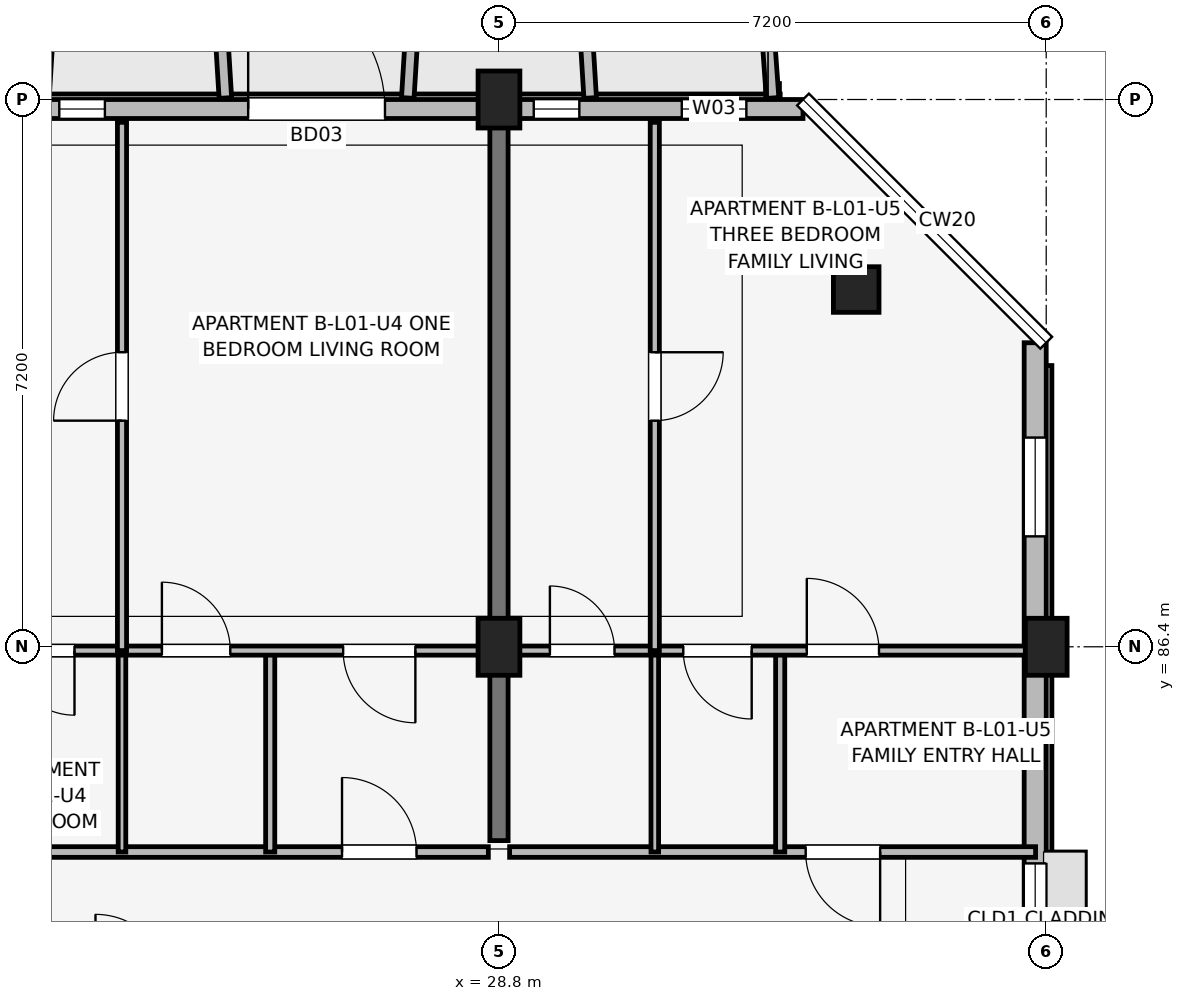
"""IFC4 building model, lengths in metres.
Left out: names, types, materials, properties, quantities, classifications, styles, units other than length and angle.
Written with IfcOpenShell. Run it as: python <this file> out.ifc"""

import sys

from ifc_helpers import new_model, si_unit, direction, frame, frame_2d, origin, origin_2d, place, context, subcontext, project, spatial, rectangle, extrude, element, fill, save


model = new_model("IFC4")
c1 = context("Model", 3, precision=1e-05, world=origin(), true_north=direction((0.0, 1.0)))
c2 = subcontext(c1, "Body", "Model", "MODEL_VIEW")
j1 = project(units=[si_unit("LENGTHUNIT", "METRE"), si_unit("PLANEANGLEUNIT", "RADIAN")], contexts=[c1])
p1 = place(None, origin())
s1 = spatial("IfcSite", under=j1, at=p1, CompositionType="ELEMENT")
p2 = place(p1, origin())
s2 = spatial("IfcBuilding", under=s1, at=p2, CompositionType="ELEMENT")
p3 = place(p2, frame((0.0, 0.0, 4.5)))
s3 = spatial("IfcBuildingStorey", under=s2, at=p3, CompositionType="ELEMENT", Elevation=4.5)
for number, where, z_axis, x_axis in (
    (1, (28.8, 86.4, 0.0), (0.0, 0.0, 1.0), (1.0, 0.0, 0.0)),
    (2, (28.8, 93.6, 0.0), (0.0, 0.0, 1.0), (1.0, 0.0, 0.0)),
    (3, (36.0, 86.4, 0.0), (0.0, 0.0, 1.0), (1.0, 0.0, 0.0)),
):
    element("IfcColumn", number, at=place(p3, frame(where, z_axis=z_axis, x_axis=x_axis)), inside=s3, PredefinedType="COLUMN", context=c2, shape_type="SweptSolid", body=[
        extrude(rectangle(XDim=0.55, YDim=0.75, at=origin_2d()), origin(), (0.0, 0.0, 1.0), 4.2),
    ])
p4 = place(p3, frame((33.5, 91.1, 0.0), z_axis=(0.0, 0.0, 1.0), x_axis=(1.0, 0.0, 0.0)))
e4 = element("IfcColumn", 4, at=p4, inside=s3, PredefinedType="COLUMN", context=c2, shape_type="SweptSolid", body=[
    extrude(rectangle(XDim=0.6, YDim=0.6, at=origin_2d()), origin(), (0.0, 0.0, 1.0), 4.2),
])
p5 = place(p3, frame((28.8, 83.85, 0.0), z_axis=(0.0, 0.0, 1.0), x_axis=(0.0, 1.0, 0.0)))
e5 = element("IfcWall", 5, at=p5, inside=s3, PredefinedType="SHEAR", context=c2, shape_type="SweptSolid", body=[
    extrude(rectangle(XDim=9.4, YDim=0.24, at=frame_2d((4.7, 0.0))), origin(), (0.0, 0.0, 1.0), 4.2),
])
p6 = place(p3, frame((35.855, 75.2, 0.0), z_axis=(0.0, 0.0, 1.0), x_axis=(0.0, 1.0, 0.0)))
e6 = element("IfcWall", 6, at=p6, inside=s3, PredefinedType="SOLIDWALL", context=c2, shape_type="SweptSolid", body=[
    extrude(rectangle(XDim=15.2, YDim=0.29, at=frame_2d((7.6, 0.0))), origin(), (0.0, 0.0, 1.0), 3.43),
])
p7 = place(p6, frame((1.6, 0.0, 0.0), z_axis=(0.0, 0.0, 1.0), x_axis=(-1.0, 0.0, 0.0)))
e7 = element("IfcOpeningElement", 7, at=p7, cuts=e6, PredefinedType="OPENING", context=c2, shape_type="SweptSolid", body=[
    extrude(rectangle(XDim=1.1, YDim=2.15, at=frame_2d((0.55, 1.075))), frame((0.0, 0.155, 0.0), z_axis=(0.0, -1.0, 0.0), x_axis=(1.0, 0.0, 0.0)), (0.0, 0.0, 1.0), 0.31),
])
p8 = place(p6, frame((6.85, 0.0, 1.05)))
e8 = element("IfcOpeningElement", 8, at=p8, cuts=e6, PredefinedType="OPENING", context=c2, shape_type="SweptSolid", body=[
    extrude(rectangle(XDim=1.5, YDim=1.15, at=frame_2d((0.75, 0.575))), frame((0.0, 0.155, 0.0), z_axis=(0.0, -1.0, 0.0), x_axis=(1.0, 0.0, 0.0)), (0.0, 0.0, 1.0), 0.31),
])
p9 = place(p6, frame((12.653, 0.0, 0.75)))
e9 = element("IfcOpeningElement", 9, at=p9, cuts=e6, PredefinedType="OPENING", context=c2, shape_type="SweptSolid", body=[
    extrude(rectangle(XDim=1.3, YDim=1.55, at=frame_2d((0.65, 0.775))), frame((0.0, 0.155, 0.0), z_axis=(0.0, -1.0, 0.0), x_axis=(1.0, 0.0, 0.0)), (0.0, 0.0, 1.0), 0.31),
])
p10 = place(p3, frame((32.8, 93.475, 0.0), z_axis=(0.0, 0.0, 1.0), x_axis=(-1.0, 0.0, 0.0)))
e10 = element("IfcWall", 10, at=p10, inside=s3, PredefinedType="SOLIDWALL", context=c2, shape_type="SweptSolid", body=[
    extrude(rectangle(XDim=29.6, YDim=0.25, at=frame_2d((14.8, 0.0))), origin(), (0.0, 0.0, 1.0), 3.48),
])
p11 = place(p10, frame((21.55, 0.0, 0.0), z_axis=(0.0, 0.0, 1.0), x_axis=(-1.0, 0.0, 0.0)))
e11 = element("IfcOpeningElement", 11, at=p11, cuts=e10, PredefinedType="OPENING", context=c2, shape_type="SweptSolid", body=[
    extrude(rectangle(XDim=1.5, YDim=2.15, at=frame_2d((0.75, 1.075))), frame((0.0, 0.135, 0.0), z_axis=(0.0, -1.0, 0.0), x_axis=(1.0, 0.0, 0.0)), (0.0, 0.0, 1.0), 0.27),
])
p12 = place(p10, frame((7.3, 0.0, 0.0), z_axis=(0.0, 0.0, 1.0), x_axis=(-1.0, 0.0, 0.0)))
e12 = element("IfcOpeningElement", 12, at=p12, cuts=e10, PredefinedType="OPENING", context=c2, shape_type="SweptSolid", body=[
    extrude(rectangle(XDim=1.8, YDim=2.15, at=frame_2d((0.9, 1.075))), frame((0.0, 0.135, 0.0), z_axis=(0.0, -1.0, 0.0), x_axis=(1.0, 0.0, 0.0)), (0.0, 0.0, 1.0), 0.27),
])
p13 = place(p10, frame((27.57, 0.0, 0.7)))
e13 = element("IfcOpeningElement", 13, at=p13, cuts=e10, PredefinedType="OPENING", context=c2, shape_type="SweptSolid", body=[
    extrude(rectangle(XDim=1.46, YDim=1.55, at=frame_2d((0.73, 0.775))), frame((0.0, 0.135, 0.0), z_axis=(0.0, -1.0, 0.0), x_axis=(1.0, 0.0, 0.0)), (0.0, 0.0, 1.0), 0.27),
])
p14 = place(p10, frame((26.058, 0.0, 0.75)))
e14 = element("IfcOpeningElement", 14, at=p14, cuts=e10, PredefinedType="OPENING", context=c2, shape_type="SweptSolid", body=[
    extrude(rectangle(XDim=0.6, YDim=1.25, at=frame_2d((0.3, 0.625))), frame((0.0, 0.135, 0.0), z_axis=(0.0, -1.0, 0.0), x_axis=(1.0, 0.0, 0.0)), (0.0, 0.0, 1.0), 0.27),
])
p15 = place(p10, frame((24.542, 0.0, 0.75)))
e15 = element("IfcOpeningElement", 15, at=p15, cuts=e10, PredefinedType="OPENING", context=c2, shape_type="SweptSolid", body=[
    extrude(rectangle(XDim=0.6, YDim=1.25, at=frame_2d((0.3, 0.625))), frame((0.0, 0.135, 0.0), z_axis=(0.0, -1.0, 0.0), x_axis=(1.0, 0.0, 0.0)), (0.0, 0.0, 1.0), 0.27),
])
p16 = place(p10, frame((14.925, 0.0, 0.7)))
e16 = element("IfcOpeningElement", 16, at=p16, cuts=e10, PredefinedType="OPENING", context=c2, shape_type="SweptSolid", body=[
    extrude(rectangle(XDim=2.15, YDim=1.65, at=frame_2d((1.075, 0.825))), frame((0.0, 0.135, 0.0), z_axis=(0.0, -1.0, 0.0), x_axis=(1.0, 0.0, 0.0)), (0.0, 0.0, 1.0), 0.27),
])
p17 = place(p10, frame((12.545, 0.0, 0.75)))
e17 = element("IfcOpeningElement", 17, at=p17, cuts=e10, PredefinedType="OPENING", context=c2, shape_type="SweptSolid", body=[
    extrude(rectangle(XDim=1.46, YDim=1.55, at=frame_2d((0.73, 0.775))), frame((0.0, 0.135, 0.0), z_axis=(0.0, -1.0, 0.0), x_axis=(1.0, 0.0, 0.0)), (0.0, 0.0, 1.0), 0.27),
])
p18 = place(p10, frame((9.185, 0.0, 0.75)))
e18 = element("IfcOpeningElement", 18, at=p18, cuts=e10, PredefinedType="OPENING", context=c2, shape_type="SweptSolid", body=[
    extrude(rectangle(XDim=0.6, YDim=1.25, at=frame_2d((0.3, 0.625))), frame((0.0, 0.135, 0.0), z_axis=(0.0, -1.0, 0.0), x_axis=(1.0, 0.0, 0.0)), (0.0, 0.0, 1.0), 0.27),
])
p19 = place(p10, frame((2.942, 0.0, 0.75)))
e19 = element("IfcOpeningElement", 19, at=p19, cuts=e10, PredefinedType="OPENING", context=c2, shape_type="SweptSolid", body=[
    extrude(rectangle(XDim=0.6, YDim=1.25, at=frame_2d((0.3, 0.625))), frame((0.0, 0.135, 0.0), z_axis=(0.0, -1.0, 0.0), x_axis=(1.0, 0.0, 0.0)), (0.0, 0.0, 1.0), 0.27),
])
p20 = place(p10, frame((0.745, 0.0, 0.75)))
e20 = element("IfcOpeningElement", 20, at=p20, cuts=e10, PredefinedType="OPENING", context=c2, shape_type="SweptSolid", body=[
    extrude(rectangle(XDim=0.85, YDim=1.4, at=frame_2d((0.425, 0.7))), frame((0.0, 0.135, 0.0), z_axis=(0.0, -1.0, 0.0), x_axis=(1.0, 0.0, 0.0)), (0.0, 0.0, 1.0), 0.27),
])
for number, where, z_axis, x_axis in (
    (21, (22.8, 93.62, 0.0), (0.0, 0.0, 1.0), (0.061, 0.998, 0.0)),
    (22, (25.2, 93.62, 0.0), (0.0, 0.0, 1.0), (-0.061, 0.998, 0.0)),
    (23, (27.6, 93.62, 0.0), (0.0, 0.0, 1.0), (0.061, 0.998, 0.0)),
):
    element("IfcWall", number, at=place(p3, frame(where, z_axis=z_axis, x_axis=x_axis)), inside=s3, PredefinedType="ELEMENTEDWALL", context=c2, shape_type="SweptSolid", body=[
        extrude(rectangle(XDim=1.964, YDim=0.165, at=frame_2d((0.982, 0.0))), origin(), (0.0, 0.0, 1.0), 3.63),
    ])
p21 = place(p3, frame((30.0, 93.62, 0.0), z_axis=(0.0, 0.0, 1.0), x_axis=(-0.061170732449, 0.998127317276, 0.0)))
e24 = element("IfcWall", 24, at=p21, inside=s3, PredefinedType="ELEMENTEDWALL", context=c2, shape_type="SweptSolid", body=[
    extrude(rectangle(XDim=1.964, YDim=0.165, at=frame_2d((0.982, 0.0))), origin(), (0.0, 0.0, 1.0), 4.0),
])
p22 = place(p3, frame((32.4, 93.62, 0.0), z_axis=(0.0, 0.0, 1.0), x_axis=(-0.071194071069, 0.997462482625, 0.0)))
e25 = element("IfcWall", 25, at=p22, inside=s3, PredefinedType="ELEMENTEDWALL", context=c2, shape_type="SweptSolid", body=[
    extrude(rectangle(XDim=1.965, YDim=0.165, at=frame_2d((0.982, 0.0))), origin(), (0.0, 0.0, 1.0), 4.0),
])
p23 = place(p3, frame((21.74, 83.7, 0.0), z_axis=(0.0, 0.0, 1.0), x_axis=(1.0, 0.0, 0.0)))
e26 = element("IfcWall", 26, at=p23, inside=s3, PredefinedType="PARTITIONING", context=c2, shape_type="SweptSolid", body=[
    extrude(rectangle(XDim=6.92, YDim=0.14, at=frame_2d((3.46, 0.0))), origin(), (0.0, 0.0, 1.0), 3.25),
])
p24 = place(p23, frame((4.995, 0.0, 0.0)))
e27 = element("IfcOpeningElement", 27, at=p24, cuts=e26, PredefinedType="OPENING", context=c2, shape_type="SweptSolid", body=[
    extrude(rectangle(XDim=0.98, YDim=2.1, at=frame_2d((0.49, 1.05))), frame((0.0, 0.08, 0.0), z_axis=(0.0, -1.0, 0.0), x_axis=(1.0, 0.0, 0.0)), (0.0, 0.0, 1.0), 0.16),
])
p25 = place(p3, frame((23.84, 83.7, 0.0), z_axis=(0.0, 0.0, 1.0), x_axis=(0.0, 1.0, 0.0)))
e28 = element("IfcWall", 28, at=p25, inside=s3, PredefinedType="PARTITIONING", context=c2, shape_type="SweptSolid", body=[
    extrude(rectangle(XDim=2.65, YDim=0.1, at=frame_2d((1.325, 0.0))), origin(), (0.0, 0.0, 1.0), 3.25),
])
p26 = place(p3, frame((25.79, 83.7, 0.0), z_axis=(0.0, 0.0, 1.0), x_axis=(0.0, 1.0, 0.0)))
e29 = element("IfcWall", 29, at=p26, inside=s3, PredefinedType="PARTITIONING", context=c2, shape_type="SweptSolid", body=[
    extrude(rectangle(XDim=2.65, YDim=0.12, at=frame_2d((1.325, 0.0))), origin(), (0.0, 0.0, 1.0), 3.25),
])
p27 = place(p3, frame((21.74, 86.35, 0.0), z_axis=(0.0, 0.0, 1.0), x_axis=(1.0, 0.0, 0.0)))
e30 = element("IfcWall", 30, at=p27, inside=s3, PredefinedType="PARTITIONING", context=c2, shape_type="SweptSolid", body=[
    extrude(rectangle(XDim=6.92, YDim=0.12, at=frame_2d((3.46, 0.0))), origin(), (0.0, 0.0, 1.0), 3.25),
])
p28 = place(p27, frame((1.475, 0.0, 0.0), z_axis=(0.0, 0.0, 1.0), x_axis=(-1.0, 0.0, 0.0)))
e31 = element("IfcOpeningElement", 31, at=p28, cuts=e30, PredefinedType="OPENING", context=c2, shape_type="SweptSolid", body=[
    extrude(rectangle(XDim=0.85, YDim=2.08, at=frame_2d((0.425, 1.04))), frame((0.0, 0.07, 0.0), z_axis=(0.0, -1.0, 0.0), x_axis=(1.0, 0.0, 0.0)), (0.0, 0.0, 1.0), 0.14),
])
p29 = place(p27, frame((2.625, 0.0, 0.0)))
e32 = element("IfcOpeningElement", 32, at=p29, cuts=e30, PredefinedType="OPENING", context=c2, shape_type="SweptSolid", body=[
    extrude(rectangle(XDim=0.9, YDim=2.08, at=frame_2d((0.45, 1.04))), frame((0.0, 0.07, 0.0), z_axis=(0.0, -1.0, 0.0), x_axis=(1.0, 0.0, 0.0)), (0.0, 0.0, 1.0), 0.14),
])
p30 = place(p27, frame((5.96, 0.0, 0.0), z_axis=(0.0, 0.0, 1.0), x_axis=(-1.0, 0.0, 0.0)))
e33 = element("IfcOpeningElement", 33, at=p30, cuts=e30, PredefinedType="OPENING", context=c2, shape_type="SweptSolid", body=[
    extrude(rectangle(XDim=0.95, YDim=2.08, at=frame_2d((0.475, 1.04))), frame((0.0, 0.07, 0.0), z_axis=(0.0, -1.0, 0.0), x_axis=(1.0, 0.0, 0.0)), (0.0, 0.0, 1.0), 0.14),
])
p31 = place(p3, frame((23.84, 86.35, 0.0), z_axis=(0.0, 0.0, 1.0), x_axis=(0.0, 1.0, 0.0)))
e34 = element("IfcWall", 34, at=p31, inside=s3, PredefinedType="PARTITIONING", context=c2, shape_type="SweptSolid", body=[
    extrude(rectangle(XDim=6.95, YDim=0.12, at=frame_2d((3.475, 0.0))), origin(), (0.0, 0.0, 1.0), 3.25),
])
p32 = place(p31, frame((3.025, 0.0, 0.0)))
e35 = element("IfcOpeningElement", 35, at=p32, cuts=e34, PredefinedType="OPENING", context=c2, shape_type="SweptSolid", body=[
    extrude(rectangle(XDim=0.9, YDim=2.08, at=frame_2d((0.45, 1.04))), frame((0.0, 0.07, 0.0), z_axis=(0.0, -1.0, 0.0), x_axis=(1.0, 0.0, 0.0)), (0.0, 0.0, 1.0), 0.14),
])
p33 = place(p3, frame((28.94, 83.7, 0.0), z_axis=(0.0, 0.0, 1.0), x_axis=(1.0, 0.0, 0.0)))
e36 = element("IfcWall", 36, at=p33, inside=s3, PredefinedType="PARTITIONING", context=c2, shape_type="SweptSolid", body=[
    extrude(rectangle(XDim=6.92, YDim=0.14, at=frame_2d((3.46, 0.0))), origin(), (0.0, 0.0, 1.0), 3.25),
])
p34 = place(p33, frame((4.875, 0.0, 0.0), z_axis=(0.0, 0.0, 1.0), x_axis=(-1.0, 0.0, 0.0)))
e37 = element("IfcOpeningElement", 37, at=p34, cuts=e36, PredefinedType="OPENING", context=c2, shape_type="SweptSolid", body=[
    extrude(rectangle(XDim=0.98, YDim=2.1, at=frame_2d((0.49, 1.05))), frame((0.0, 0.08, 0.0), z_axis=(0.0, -1.0, 0.0), x_axis=(1.0, 0.0, 0.0)), (0.0, 0.0, 1.0), 0.16),
])
p35 = place(p3, frame((30.85, 83.7, 0.0), z_axis=(0.0, 0.0, 1.0), x_axis=(0.0, 1.0, 0.0)))
e38 = element("IfcWall", 38, at=p35, inside=s3, PredefinedType="PARTITIONING", context=c2, shape_type="SweptSolid", body=[
    extrude(rectangle(XDim=2.65, YDim=0.1, at=frame_2d((1.325, 0.0))), origin(), (0.0, 0.0, 1.0), 3.25),
])
p36 = place(p3, frame((32.5, 83.7, 0.0), z_axis=(0.0, 0.0, 1.0), x_axis=(0.0, 1.0, 0.0)))
e39 = element("IfcWall", 39, at=p36, inside=s3, PredefinedType="PARTITIONING", context=c2, shape_type="SweptSolid", body=[
    extrude(rectangle(XDim=2.65, YDim=0.12, at=frame_2d((1.325, 0.0))), origin(), (0.0, 0.0, 1.0), 3.25),
])
p37 = place(p3, frame((28.94, 86.35, 0.0), z_axis=(0.0, 0.0, 1.0), x_axis=(1.0, 0.0, 0.0)))
e40 = element("IfcWall", 40, at=p37, inside=s3, PredefinedType="PARTITIONING", context=c2, shape_type="SweptSolid", body=[
    extrude(rectangle(XDim=6.92, YDim=0.12, at=frame_2d((3.46, 0.0))), origin(), (0.0, 0.0, 1.0), 3.25),
])
p38 = place(p37, frame((0.53, 0.0, 0.0)))
e41 = element("IfcOpeningElement", 41, at=p38, cuts=e40, PredefinedType="OPENING", context=c2, shape_type="SweptSolid", body=[
    extrude(rectangle(XDim=0.85, YDim=2.08, at=frame_2d((0.425, 1.04))), frame((0.0, 0.07, 0.0), z_axis=(0.0, -1.0, 0.0), x_axis=(1.0, 0.0, 0.0)), (0.0, 0.0, 1.0), 0.14),
])
p39 = place(p37, frame((3.185, 0.0, 0.0), z_axis=(0.0, 0.0, 1.0), x_axis=(-1.0, 0.0, 0.0)))
e42 = element("IfcOpeningElement", 42, at=p39, cuts=e40, PredefinedType="OPENING", context=c2, shape_type="SweptSolid", body=[
    extrude(rectangle(XDim=0.9, YDim=2.08, at=frame_2d((0.45, 1.04))), frame((0.0, 0.07, 0.0), z_axis=(0.0, -1.0, 0.0), x_axis=(1.0, 0.0, 0.0)), (0.0, 0.0, 1.0), 0.14),
])
p40 = place(p37, frame((3.91, 0.0, 0.0)))
e43 = element("IfcOpeningElement", 43, at=p40, cuts=e40, PredefinedType="OPENING", context=c2, shape_type="SweptSolid", body=[
    extrude(rectangle(XDim=0.95, YDim=2.08, at=frame_2d((0.475, 1.04))), frame((0.0, 0.07, 0.0), z_axis=(0.0, -1.0, 0.0), x_axis=(1.0, 0.0, 0.0)), (0.0, 0.0, 1.0), 0.14),
])
p41 = place(p3, frame((30.85, 86.35, 0.0), z_axis=(0.0, 0.0, 1.0), x_axis=(0.0, 1.0, 0.0)))
e44 = element("IfcWall", 44, at=p41, inside=s3, PredefinedType="PARTITIONING", context=c2, shape_type="SweptSolid", body=[
    extrude(rectangle(XDim=6.95, YDim=0.12, at=frame_2d((3.475, 0.0))), origin(), (0.0, 0.0, 1.0), 3.25),
])
p42 = place(p41, frame((3.925, 0.0, 0.0), z_axis=(0.0, 0.0, 1.0), x_axis=(-1.0, 0.0, 0.0)))
e45 = element("IfcOpeningElement", 45, at=p42, cuts=e44, PredefinedType="OPENING", context=c2, shape_type="SweptSolid", body=[
    extrude(rectangle(XDim=0.9, YDim=2.08, at=frame_2d((0.45, 1.04))), frame((0.0, 0.07, 0.0), z_axis=(0.0, -1.0, 0.0), x_axis=(1.0, 0.0, 0.0)), (0.0, 0.0, 1.0), 0.14),
])
p43 = place(p12, origin())
e46 = element("IfcDoor", 46, at=p43, inside=s3, OperationType="SINGLE_SWING_RIGHT", PredefinedType="DOOR", context=c2, shape_type="SweptSolid", body=[
    extrude(rectangle(XDim=1.8, YDim=2.15, at=frame_2d((0.9, 1.075))), frame((0.0, 0.025, 0.0), z_axis=(0.0, -1.0, 0.0), x_axis=(1.0, 0.0, 0.0)), (0.0, 0.0, 1.0), 0.05),
])
fill(e12, e46)
p44 = place(p18, origin())
e47 = element("IfcWindow", 47, at=p44, inside=s3, PartitioningType="SINGLE_PANEL", PredefinedType="WINDOW", context=c2, shape_type="SweptSolid", body=[
    extrude(rectangle(XDim=0.6, YDim=1.25, at=frame_2d((0.3, 0.625))), frame((0.0, 0.03, 0.0), z_axis=(0.0, -1.0, 0.0), x_axis=(1.0, 0.0, 0.0)), (0.0, 0.0, 1.0), 0.06),
])
fill(e18, e47)
p45 = place(p19, origin())
e48 = element("IfcWindow", 48, at=p45, inside=s3, PartitioningType="SINGLE_PANEL", PredefinedType="WINDOW", context=c2, shape_type="SweptSolid", body=[
    extrude(rectangle(XDim=0.6, YDim=1.25, at=frame_2d((0.3, 0.625))), frame((0.0, 0.03, 0.0), z_axis=(0.0, -1.0, 0.0), x_axis=(1.0, 0.0, 0.0)), (0.0, 0.0, 1.0), 0.06),
])
fill(e19, e48)
p46 = place(p20, origin())
e49 = element("IfcWindow", 49, at=p46, inside=s3, PartitioningType="SINGLE_PANEL", PredefinedType="WINDOW", context=c2, shape_type="SweptSolid", body=[
    extrude(rectangle(XDim=0.85, YDim=1.4, at=frame_2d((0.425, 0.7))), frame((0.0, 0.03, 0.0), z_axis=(0.0, -1.0, 0.0), x_axis=(1.0, 0.0, 0.0)), (0.0, 0.0, 1.0), 0.06),
])
fill(e20, e49)
p47 = place(p8, origin())
e50 = element("IfcWindow", 50, at=p47, inside=s3, PartitioningType="SINGLE_PANEL", PredefinedType="WINDOW", context=c2, shape_type="SweptSolid", body=[
    extrude(rectangle(XDim=1.5, YDim=1.15, at=frame_2d((0.75, 0.575))), frame((0.0, 0.03, 0.0), z_axis=(0.0, -1.0, 0.0), x_axis=(1.0, 0.0, 0.0)), (0.0, 0.0, 1.0), 0.06),
])
fill(e8, e50)
p48 = place(p9, origin())
e51 = element("IfcWindow", 51, at=p48, inside=s3, PartitioningType="SINGLE_PANEL", PredefinedType="WINDOW", context=c2, shape_type="SweptSolid", body=[
    extrude(rectangle(XDim=1.3, YDim=1.55, at=frame_2d((0.65, 0.775))), frame((0.0, 0.03, 0.0), z_axis=(0.0, -1.0, 0.0), x_axis=(1.0, 0.0, 0.0)), (0.0, 0.0, 1.0), 0.06),
])
fill(e9, e51)
p49 = place(p24, origin())
e52 = element("IfcDoor", 52, at=p49, inside=s3, OperationType="SINGLE_SWING_LEFT", PredefinedType="DOOR", context=c2, shape_type="SweptSolid", body=[
    extrude(rectangle(XDim=0.98, YDim=2.1, at=frame_2d((0.49, 1.05))), frame((0.0, 0.025, 0.0), z_axis=(0.0, -1.0, 0.0), x_axis=(1.0, 0.0, 0.0)), (0.0, 0.0, 1.0), 0.05),
])
fill(e27, e52)
p50 = place(p28, origin())
e53 = element("IfcDoor", 53, at=p50, inside=s3, OperationType="SINGLE_SWING_RIGHT", PredefinedType="DOOR", context=c2, shape_type="SweptSolid", body=[
    extrude(rectangle(XDim=0.85, YDim=2.08, at=frame_2d((0.425, 1.04))), frame((0.0, 0.025, 0.0), z_axis=(0.0, -1.0, 0.0), x_axis=(1.0, 0.0, 0.0)), (0.0, 0.0, 1.0), 0.05),
])
fill(e31, e53)
p51 = place(p29, origin())
e54 = element("IfcDoor", 54, at=p51, inside=s3, OperationType="SINGLE_SWING_LEFT", PredefinedType="DOOR", context=c2, shape_type="SweptSolid", body=[
    extrude(rectangle(XDim=0.9, YDim=2.08, at=frame_2d((0.45, 1.04))), frame((0.0, 0.025, 0.0), z_axis=(0.0, -1.0, 0.0), x_axis=(1.0, 0.0, 0.0)), (0.0, 0.0, 1.0), 0.05),
])
fill(e32, e54)
p52 = place(p30, origin())
e55 = element("IfcDoor", 55, at=p52, inside=s3, OperationType="SINGLE_SWING_RIGHT", PredefinedType="DOOR", context=c2, shape_type="SweptSolid", body=[
    extrude(rectangle(XDim=0.95, YDim=2.08, at=frame_2d((0.475, 1.04))), frame((0.0, 0.025, 0.0), z_axis=(0.0, -1.0, 0.0), x_axis=(1.0, 0.0, 0.0)), (0.0, 0.0, 1.0), 0.05),
])
fill(e33, e55)
p53 = place(p32, origin())
e56 = element("IfcDoor", 56, at=p53, inside=s3, OperationType="SINGLE_SWING_LEFT", PredefinedType="DOOR", context=c2, shape_type="SweptSolid", body=[
    extrude(rectangle(XDim=0.9, YDim=2.08, at=frame_2d((0.45, 1.04))), frame((0.0, 0.025, 0.0), z_axis=(0.0, -1.0, 0.0), x_axis=(1.0, 0.0, 0.0)), (0.0, 0.0, 1.0), 0.05),
])
fill(e35, e56)
p54 = place(p34, origin())
e57 = element("IfcDoor", 57, at=p54, inside=s3, OperationType="SINGLE_SWING_RIGHT", PredefinedType="DOOR", context=c2, shape_type="SweptSolid", body=[
    extrude(rectangle(XDim=0.98, YDim=2.1, at=frame_2d((0.49, 1.05))), frame((0.0, 0.025, 0.0), z_axis=(0.0, -1.0, 0.0), x_axis=(1.0, 0.0, 0.0)), (0.0, 0.0, 1.0), 0.05),
])
fill(e37, e57)
p55 = place(p38, origin())
e58 = element("IfcDoor", 58, at=p55, inside=s3, OperationType="SINGLE_SWING_LEFT", PredefinedType="DOOR", context=c2, shape_type="SweptSolid", body=[
    extrude(rectangle(XDim=0.85, YDim=2.08, at=frame_2d((0.425, 1.04))), frame((0.0, 0.025, 0.0), z_axis=(0.0, -1.0, 0.0), x_axis=(1.0, 0.0, 0.0)), (0.0, 0.0, 1.0), 0.05),
])
fill(e41, e58)
p56 = place(p39, origin())
e59 = element("IfcDoor", 59, at=p56, inside=s3, OperationType="SINGLE_SWING_RIGHT", PredefinedType="DOOR", context=c2, shape_type="SweptSolid", body=[
    extrude(rectangle(XDim=0.9, YDim=2.08, at=frame_2d((0.45, 1.04))), frame((0.0, 0.025, 0.0), z_axis=(0.0, -1.0, 0.0), x_axis=(1.0, 0.0, 0.0)), (0.0, 0.0, 1.0), 0.05),
])
fill(e42, e59)
p57 = place(p40, origin())
e60 = element("IfcDoor", 60, at=p57, inside=s3, OperationType="SINGLE_SWING_LEFT", PredefinedType="DOOR", context=c2, shape_type="SweptSolid", body=[
    extrude(rectangle(XDim=0.95, YDim=2.08, at=frame_2d((0.475, 1.04))), frame((0.0, 0.025, 0.0), z_axis=(0.0, -1.0, 0.0), x_axis=(1.0, 0.0, 0.0)), (0.0, 0.0, 1.0), 0.05),
])
fill(e43, e60)
p58 = place(p42, origin())
e61 = element("IfcDoor", 61, at=p58, inside=s3, OperationType="SINGLE_SWING_RIGHT", PredefinedType="DOOR", context=c2, shape_type="SweptSolid", body=[
    extrude(rectangle(XDim=0.9, YDim=2.08, at=frame_2d((0.45, 1.04))), frame((0.0, 0.025, 0.0), z_axis=(0.0, -1.0, 0.0), x_axis=(1.0, 0.0, 0.0)), (0.0, 0.0, 1.0), 0.05),
])
fill(e45, e61)
save(model, sys.argv[1])
